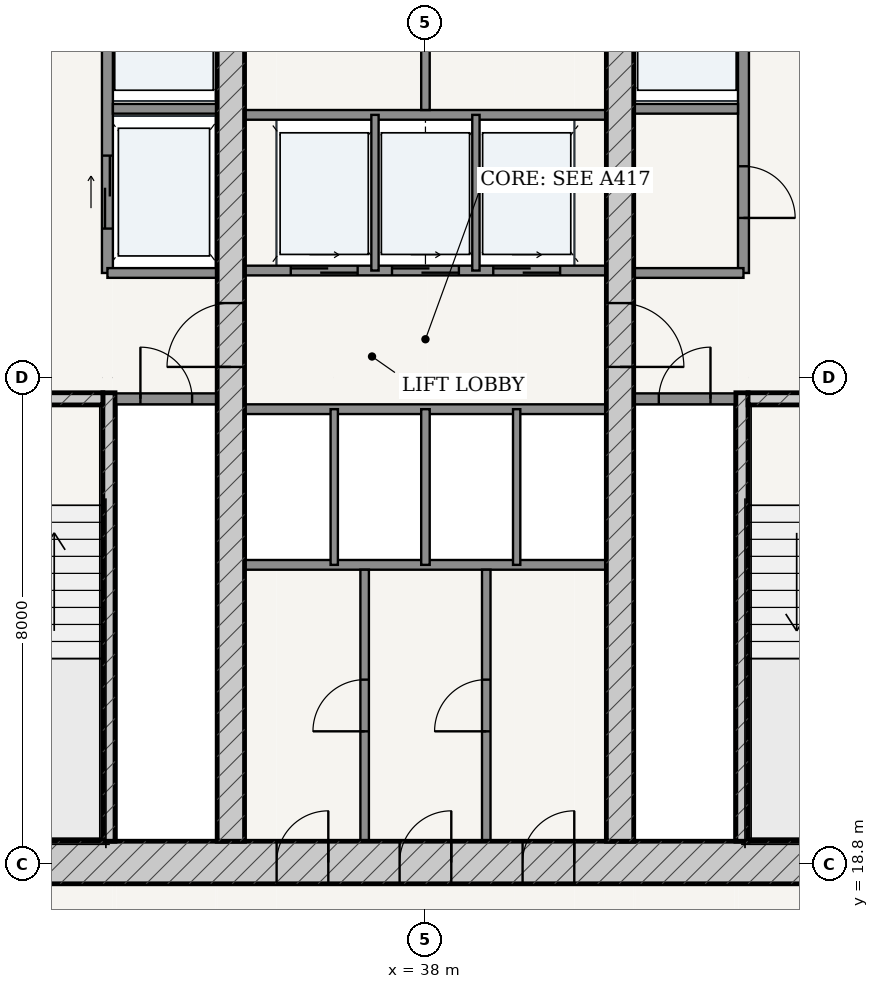
"""IFC4 building model, lengths in metres.
Left out: names, types, materials, properties, quantities, classifications, styles, units other than length and angle.
Written with IfcOpenShell. Run it as: python <this file> out.ifc"""

import sys

from ifc_helpers import new_model, si_unit, direction, frame, frame_2d, origin, place, context, subcontext, project, spatial, rectangle, extrude, source, transform, mapped, element, fill, save


model = new_model("IFC4")
c1 = context("Model", 3, precision=1e-05, world=origin(), true_north=direction((-0.2419218956, 0.970295726276)))
c2 = subcontext(c1, "Body", "Model", "MODEL_VIEW")
j1 = project(units=[si_unit("LENGTHUNIT", "METRE"), si_unit("PLANEANGLEUNIT", "RADIAN")], contexts=[c1])
p1 = place(None, origin())
s1 = spatial("IfcSite", under=j1, at=p1, CompositionType="ELEMENT")
p2 = place(p1, origin())
s2 = spatial("IfcBuilding", under=s1, at=p2, CompositionType="ELEMENT")
p3 = place(p2, frame((0.0, 0.0, 108.6)))
s3 = spatial("IfcBuildingStorey", under=s2, at=p3, CompositionType="ELEMENT", Elevation=108.6)
p4 = place(p3, frame((28.675, 18.825, 0.0), z_axis=(0.0, 0.0, 1.0), x_axis=(1.0, 0.0, 0.0)))
e1 = element("IfcWall", 1, at=p4, inside=s3, PredefinedType="SHEAR", context=c2, shape_type="SweptSolid", body=[
    extrude(rectangle(XDim=18.65, YDim=0.7, at=frame_2d((9.325, 0.0))), origin(), (0.0, 0.0, 1.0), 3.325),
])
p5 = place(p4, frame((6.877, 0.0, 0.0)))
e2 = element("IfcOpeningElement", 2, at=p5, cuts=e1, PredefinedType="OPENING", context=c2, shape_type="SweptSolid", body=[
    extrude(rectangle(XDim=0.85, YDim=2.1, at=frame_2d((0.425, 1.05))), frame((0.0, 0.36, 0.0), z_axis=(0.0, -1.0, 0.0), x_axis=(1.0, 0.0, 0.0)), (0.0, 0.0, 1.0), 0.72),
])
p6 = place(p4, frame((8.9, 0.0, 0.0)))
e3 = element("IfcOpeningElement", 3, at=p6, cuts=e1, PredefinedType="OPENING", context=c2, shape_type="SweptSolid", body=[
    extrude(rectangle(XDim=0.85, YDim=2.1, at=frame_2d((0.425, 1.05))), frame((0.0, 0.36, 0.0), z_axis=(0.0, -1.0, 0.0), x_axis=(1.0, 0.0, 0.0)), (0.0, 0.0, 1.0), 0.72),
])
p7 = place(p4, frame((10.923, 0.0, 0.0)))
e4 = element("IfcOpeningElement", 4, at=p7, cuts=e1, PredefinedType="OPENING", context=c2, shape_type="SweptSolid", body=[
    extrude(rectangle(XDim=0.85, YDim=2.1, at=frame_2d((0.425, 1.05))), frame((0.0, 0.36, 0.0), z_axis=(0.0, -1.0, 0.0), x_axis=(1.0, 0.0, 0.0)), (0.0, 0.0, 1.0), 0.72),
])
p8 = place(p3, frame((32.795, 19.175, 0.0), z_axis=(0.0, 0.0, 1.0), x_axis=(0.0, 1.0, 0.0)))
e5 = element("IfcWall", 5, at=p8, inside=s3, PredefinedType="SOLIDWALL", context=c2, shape_type="SweptSolid", body=[
    extrude(rectangle(XDim=7.375, YDim=0.2, at=frame_2d((3.688, 0.0))), origin(), (0.0, 0.0, 1.0), 3.325),
])
p9 = place(p3, frame((29.375, 26.45, 0.0), z_axis=(0.0, 0.0, 1.0), x_axis=(1.0, 0.0, 0.0)))
e6 = element("IfcWall", 6, at=p9, inside=s3, PredefinedType="SOLIDWALL", context=c2, shape_type="SweptSolid", body=[
    extrude(rectangle(XDim=3.32, YDim=0.2, at=frame_2d((1.66, 0.0))), origin(), (0.0, 0.0, 1.0), 3.325),
])
p10 = place(p9, frame((1.185, 0.0, 0.0)))
e7 = element("IfcOpeningElement", 7, at=p10, cuts=e6, PredefinedType="OPENING", context=c2, shape_type="SweptSolid", body=[
    extrude(rectangle(XDim=0.95, YDim=2.15, at=frame_2d((0.475, 1.075))), frame((0.0, 0.11, 0.0), z_axis=(0.0, -1.0, 0.0), x_axis=(1.0, 0.0, 0.0)), (0.0, 0.0, 1.0), 0.22),
])
p11 = place(p3, frame((43.205, 19.175, 0.0), z_axis=(0.0, 0.0, 1.0), x_axis=(0.0, 1.0, 0.0)))
e8 = element("IfcWall", 8, at=p11, inside=s3, PredefinedType="SOLIDWALL", context=c2, shape_type="SweptSolid", body=[
    extrude(rectangle(XDim=7.375, YDim=0.2, at=frame_2d((3.688, 0.0))), origin(), (0.0, 0.0, 1.0), 3.325),
])
p12 = place(p3, frame((43.305, 26.45, 0.0), z_axis=(0.0, 0.0, 1.0), x_axis=(1.0, 0.0, 0.0)))
e9 = element("IfcWall", 9, at=p12, inside=s3, PredefinedType="SOLIDWALL", context=c2, shape_type="SweptSolid", body=[
    extrude(rectangle(XDim=3.32, YDim=0.2, at=frame_2d((1.66, 0.0))), origin(), (0.0, 0.0, 1.0), 3.325),
])
p13 = place(p12, frame((1.185, 0.0, 0.0)))
e10 = element("IfcOpeningElement", 10, at=p13, cuts=e9, PredefinedType="OPENING", context=c2, shape_type="SweptSolid", body=[
    extrude(rectangle(XDim=0.95, YDim=2.15, at=frame_2d((0.475, 1.075))), frame((0.0, 0.11, 0.0), z_axis=(0.0, -1.0, 0.0), x_axis=(1.0, 0.0, 0.0)), (0.0, 0.0, 1.0), 0.22),
])
p14 = place(p3, frame((34.8, 19.175, 0.0), z_axis=(0.0, 0.0, 1.0), x_axis=(0.0, 1.0, 0.0)))
e11 = element("IfcWall", 11, at=p14, inside=s3, PredefinedType="SHEAR", context=c2, shape_type="SweptSolid", body=[
    extrude(rectangle(XDim=15.25, YDim=0.45, at=frame_2d((7.625, 0.0))), origin(), (0.0, 0.0, 1.0), 3.325),
])
p15 = place(p14, frame((7.8, 0.0, 0.0)))
e12 = element("IfcOpeningElement", 12, at=p15, cuts=e11, PredefinedType="OPENING", context=c2, shape_type="SweptSolid", body=[
    extrude(rectangle(XDim=1.05, YDim=2.15, at=frame_2d((0.525, 1.075))), frame((0.0, 0.235, 0.0), z_axis=(0.0, -1.0, 0.0), x_axis=(1.0, 0.0, 0.0)), (0.0, 0.0, 1.0), 0.47),
])
p16 = place(p3, frame((41.2, 19.175, 0.0), z_axis=(0.0, 0.0, 1.0), x_axis=(0.0, 1.0, 0.0)))
e13 = element("IfcWall", 13, at=p16, inside=s3, PredefinedType="SHEAR", context=c2, shape_type="SweptSolid", body=[
    extrude(rectangle(XDim=15.25, YDim=0.45, at=frame_2d((7.625, 0.0))), origin(), (0.0, 0.0, 1.0), 3.325),
])
p17 = place(p16, frame((7.8, 0.0, 0.0)))
e14 = element("IfcOpeningElement", 14, at=p17, cuts=e13, PredefinedType="OPENING", context=c2, shape_type="SweptSolid", body=[
    extrude(rectangle(XDim=1.05, YDim=2.15, at=frame_2d((0.525, 1.075))), frame((0.0, 0.235, 0.0), z_axis=(0.0, -1.0, 0.0), x_axis=(1.0, 0.0, 0.0)), (0.0, 0.0, 1.0), 0.47),
])
p18 = place(p3, frame((32.9, 26.45, 0.0), z_axis=(0.0, 0.0, 1.0), x_axis=(1.0, 0.0, 0.0)))
e15 = element("IfcWall", 15, at=p18, inside=s3, PredefinedType="PARTITIONING", context=c2, shape_type="SweptSolid", body=[
    extrude(rectangle(XDim=1.675, YDim=0.18, at=frame_2d((0.837, 0.0))), origin(), (0.0, 0.0, 1.0), 3.325),
])
p19 = place(p18, frame((0.413, 0.0, 0.0)))
e16 = element("IfcOpeningElement", 16, at=p19, cuts=e15, PredefinedType="OPENING", context=c2, shape_type="SweptSolid", body=[
    extrude(rectangle(XDim=0.85, YDim=2.1, at=frame_2d((0.425, 1.05))), frame((0.0, 0.1, 0.0), z_axis=(0.0, -1.0, 0.0), x_axis=(1.0, 0.0, 0.0)), (0.0, 0.0, 1.0), 0.2),
])
p20 = place(p3, frame((41.425, 26.45, 0.0), z_axis=(0.0, 0.0, 1.0), x_axis=(1.0, 0.0, 0.0)))
e17 = element("IfcWall", 17, at=p20, inside=s3, PredefinedType="PARTITIONING", context=c2, shape_type="SweptSolid", body=[
    extrude(rectangle(XDim=1.675, YDim=0.18, at=frame_2d((0.837, 0.0))), origin(), (0.0, 0.0, 1.0), 3.325),
])
p21 = place(p20, frame((0.413, 0.0, 0.0)))
e18 = element("IfcOpeningElement", 18, at=p21, cuts=e17, PredefinedType="OPENING", context=c2, shape_type="SweptSolid", body=[
    extrude(rectangle(XDim=0.85, YDim=2.1, at=frame_2d((0.425, 1.05))), frame((0.0, 0.1, 0.0), z_axis=(0.0, -1.0, 0.0), x_axis=(1.0, 0.0, 0.0)), (0.0, 0.0, 1.0), 0.2),
])
p22 = place(p3, frame((32.77, 28.52, 0.0), z_axis=(0.0, 0.0, 1.0), x_axis=(0.0, 1.0, 0.0)))
e19 = element("IfcWall", 19, at=p22, inside=s3, PredefinedType="PARTITIONING", context=c2, shape_type="SweptSolid", body=[
    extrude(rectangle(XDim=5.905, YDim=0.18, at=frame_2d((2.953, 0.0))), origin(), (0.0, 0.0, 1.0), 3.325),
])
p23 = place(p22, frame((3.655, 0.0, 0.0)))
e20 = element("IfcOpeningElement", 20, at=p23, cuts=e19, PredefinedType="OPENING", context=c2, shape_type="SweptSolid", body=[
    extrude(rectangle(XDim=1.15, YDim=2.2, at=frame_2d((0.575, 1.1))), frame((0.0, 0.1, 0.0), z_axis=(0.0, -1.0, 0.0), x_axis=(1.0, 0.0, 0.0)), (0.0, 0.0, 1.0), 0.2),
])
p24 = place(p22, frame((0.73, 0.0, 0.0)))
e21 = element("IfcOpeningElement", 21, at=p24, cuts=e19, PredefinedType="OPENING", context=c2, shape_type="SweptSolid", body=[
    extrude(rectangle(XDim=1.2, YDim=2.25, at=frame_2d((0.6, 1.125))), frame((0.0, 0.1, 0.0), z_axis=(0.0, -1.0, 0.0), x_axis=(1.0, 0.0, 0.0)), (0.0, 0.0, 1.0), 0.2),
])
p25 = place(p3, frame((32.86, 31.22, 0.0), z_axis=(0.0, 0.0, 1.0), x_axis=(1.0, 0.0, 0.0)))
e22 = element("IfcWall", 22, at=p25, inside=s3, PredefinedType="PARTITIONING", context=c2, shape_type="SweptSolid", body=[
    extrude(rectangle(XDim=1.715, YDim=0.16, at=frame_2d((0.857, 0.0))), origin(), (0.0, 0.0, 1.0), 3.325),
])
p26 = place(p3, frame((32.77, 28.52, 0.0), z_axis=(0.0, 0.0, 1.0), x_axis=(1.0, 0.0, 0.0)))
e23 = element("IfcWall", 23, at=p26, inside=s3, PredefinedType="PARTITIONING", context=c2, shape_type="SweptSolid", body=[
    extrude(rectangle(XDim=1.805, YDim=0.16, at=frame_2d((0.902, 0.0))), origin(), (0.0, 0.0, 1.0), 3.325),
])
p27 = place(p3, frame((43.23, 28.52, 0.0), z_axis=(0.0, 0.0, 1.0), x_axis=(0.0, 1.0, 0.0)))
e24 = element("IfcWall", 24, at=p27, inside=s3, PredefinedType="PARTITIONING", context=c2, shape_type="SweptSolid", body=[
    extrude(rectangle(XDim=5.905, YDim=0.18, at=frame_2d((2.953, 0.0))), origin(), (0.0, 0.0, 1.0), 3.325),
])
p28 = place(p27, frame((0.905, 0.0, 0.0)))
e25 = element("IfcOpeningElement", 25, at=p28, cuts=e24, PredefinedType="OPENING", context=c2, shape_type="SweptSolid", body=[
    extrude(rectangle(XDim=0.85, YDim=2.1, at=frame_2d((0.425, 1.05))), frame((0.0, 0.1, 0.0), z_axis=(0.0, -1.0, 0.0), x_axis=(1.0, 0.0, 0.0)), (0.0, 0.0, 1.0), 0.2),
])
p29 = place(p27, frame((3.655, 0.0, 0.0)))
e26 = element("IfcOpeningElement", 26, at=p29, cuts=e24, PredefinedType="OPENING", context=c2, shape_type="SweptSolid", body=[
    extrude(rectangle(XDim=1.15, YDim=2.2, at=frame_2d((0.575, 1.1))), frame((0.0, 0.1, 0.0), z_axis=(0.0, -1.0, 0.0), x_axis=(1.0, 0.0, 0.0)), (0.0, 0.0, 1.0), 0.2),
])
p30 = place(p3, frame((41.425, 31.22, 0.0), z_axis=(0.0, 0.0, 1.0), x_axis=(1.0, 0.0, 0.0)))
e27 = element("IfcWall", 27, at=p30, inside=s3, PredefinedType="PARTITIONING", context=c2, shape_type="SweptSolid", body=[
    extrude(rectangle(XDim=1.715, YDim=0.16, at=frame_2d((0.857, 0.0))), origin(), (0.0, 0.0, 1.0), 3.325),
])
p31 = place(p3, frame((41.425, 28.52, 0.0), z_axis=(0.0, 0.0, 1.0), x_axis=(1.0, 0.0, 0.0)))
e28 = element("IfcWall", 28, at=p31, inside=s3, PredefinedType="PARTITIONING", context=c2, shape_type="SweptSolid", body=[
    extrude(rectangle(XDim=1.805, YDim=0.16, at=frame_2d((0.902, 0.0))), origin(), (0.0, 0.0, 1.0), 3.325),
])
p32 = place(p3, frame((35.025, 28.56, 0.0), z_axis=(0.0, 0.0, 1.0), x_axis=(1.0, 0.0, 0.0)))
e29 = element("IfcWall", 29, at=p32, inside=s3, PredefinedType="PARTITIONING", context=c2, shape_type="SweptSolid", body=[
    extrude(rectangle(XDim=5.95, YDim=0.16, at=frame_2d((2.975, 0.0))), origin(), (0.0, 0.0, 1.0), 3.325),
])
p33 = place(p32, frame((0.76, 0.0, 0.0)))
e30 = element("IfcOpeningElement", 30, at=p33, cuts=e29, PredefinedType="OPENING", context=c2, shape_type="SweptSolid", body=[
    extrude(rectangle(XDim=1.1, YDim=2.2, at=frame_2d((0.55, 1.1))), frame((0.0, 0.09, 0.0), z_axis=(0.0, -1.0, 0.0), x_axis=(1.0, 0.0, 0.0)), (0.0, 0.0, 1.0), 0.18),
])
p34 = place(p32, frame((2.425, 0.0, 0.0)))
e31 = element("IfcOpeningElement", 31, at=p34, cuts=e29, PredefinedType="OPENING", context=c2, shape_type="SweptSolid", body=[
    extrude(rectangle(XDim=1.1, YDim=2.2, at=frame_2d((0.55, 1.1))), frame((0.0, 0.09, 0.0), z_axis=(0.0, -1.0, 0.0), x_axis=(1.0, 0.0, 0.0)), (0.0, 0.0, 1.0), 0.18),
])
p35 = place(p32, frame((4.09, 0.0, 0.0)))
e32 = element("IfcOpeningElement", 32, at=p35, cuts=e29, PredefinedType="OPENING", context=c2, shape_type="SweptSolid", body=[
    extrude(rectangle(XDim=1.1, YDim=2.2, at=frame_2d((0.55, 1.1))), frame((0.0, 0.09, 0.0), z_axis=(0.0, -1.0, 0.0), x_axis=(1.0, 0.0, 0.0)), (0.0, 0.0, 1.0), 0.18),
])
p36 = place(p3, frame((35.025, 31.12, 0.0), z_axis=(0.0, 0.0, 1.0), x_axis=(1.0, 0.0, 0.0)))
e33 = element("IfcWall", 33, at=p36, inside=s3, PredefinedType="PARTITIONING", context=c2, shape_type="SweptSolid", body=[
    extrude(rectangle(XDim=5.95, YDim=0.16, at=frame_2d((2.975, 0.0))), origin(), (0.0, 0.0, 1.0), 3.325),
])
for number, where, z_axis, x_axis in (
    (34, (37.17, 28.56, 0.0), (0.0, 0.0, 1.0), (0.0, 1.0, 0.0)),
    (35, (38.83, 28.56, 0.0), (0.0, 0.0, 1.0), (0.0, 1.0, 0.0)),
):
    element("IfcWall", number, at=place(p3, frame(where, z_axis=z_axis, x_axis=x_axis)), inside=s3, PredefinedType="PARTITIONING", context=c2, shape_type="SweptSolid", body=[
        extrude(rectangle(XDim=2.56, YDim=0.12, at=frame_2d((1.28, 0.0))), origin(), (0.0, 0.0, 1.0), 3.325),
    ])
p37 = place(p3, frame((38.0, 31.2, 0.0), z_axis=(0.0, 0.0, 1.0), x_axis=(0.0, 1.0, 0.0)))
e36 = element("IfcWall", 36, at=p37, inside=s3, PredefinedType="PARTITIONING", context=c2, shape_type="SweptSolid", body=[
    extrude(rectangle(XDim=3.225, YDim=0.14, at=frame_2d((1.613, 0.0))), origin(), (0.0, 0.0, 1.0), 3.325),
])
for number, where, z_axis, x_axis in (
    (37, (35.025, 26.28, 0.0), (0.0, 0.0, 1.0), (1.0, 0.0, 0.0)),
    (38, (35.025, 23.72, 0.0), (0.0, 0.0, 1.0), (1.0, 0.0, 0.0)),
):
    element("IfcWall", number, at=place(p3, frame(where, z_axis=z_axis, x_axis=x_axis)), inside=s3, PredefinedType="PARTITIONING", context=c2, shape_type="SweptSolid", body=[
        extrude(rectangle(XDim=5.95, YDim=0.16, at=frame_2d((2.975, 0.0))), origin(), (0.0, 0.0, 1.0), 3.325),
    ])
p38 = place(p3, frame((36.5, 23.72, 0.0), z_axis=(0.0, 0.0, 1.0), x_axis=(0.0, 1.0, 0.0)))
e39 = element("IfcWall", 39, at=p38, inside=s3, PredefinedType="PARTITIONING", context=c2, shape_type="SweptSolid", body=[
    extrude(rectangle(XDim=2.56, YDim=0.12, at=frame_2d((1.28, 0.0))), origin(), (0.0, 0.0, 1.0), 3.325),
])
p39 = place(p3, frame((38.0, 23.72, 0.0), z_axis=(0.0, 0.0, 1.0), x_axis=(0.0, 1.0, 0.0)))
e40 = element("IfcWall", 40, at=p39, inside=s3, PredefinedType="PARTITIONING", context=c2, shape_type="SweptSolid", body=[
    extrude(rectangle(XDim=2.56, YDim=0.14, at=frame_2d((1.28, 0.0))), origin(), (0.0, 0.0, 1.0), 3.325),
])
p40 = place(p3, frame((39.5, 23.72, 0.0), z_axis=(0.0, 0.0, 1.0), x_axis=(0.0, 1.0, 0.0)))
e41 = element("IfcWall", 41, at=p40, inside=s3, PredefinedType="PARTITIONING", context=c2, shape_type="SweptSolid", body=[
    extrude(rectangle(XDim=2.56, YDim=0.12, at=frame_2d((1.28, 0.0))), origin(), (0.0, 0.0, 1.0), 3.325),
])
p41 = place(p3, frame((37.0, 19.175, 0.0), z_axis=(0.0, 0.0, 1.0), x_axis=(0.0, 1.0, 0.0)))
e42 = element("IfcWall", 42, at=p41, inside=s3, PredefinedType="PARTITIONING", context=c2, shape_type="SweptSolid", body=[
    extrude(rectangle(XDim=4.465, YDim=0.14, at=frame_2d((2.232, 0.0))), origin(), (0.0, 0.0, 1.0), 3.325),
])
p42 = place(p41, frame((1.808, 0.0, 0.0)))
e43 = element("IfcOpeningElement", 43, at=p42, cuts=e42, PredefinedType="OPENING", context=c2, shape_type="SweptSolid", body=[
    extrude(rectangle(XDim=0.85, YDim=2.1, at=frame_2d((0.425, 1.05))), frame((0.0, 0.08, 0.0), z_axis=(0.0, -1.0, 0.0), x_axis=(1.0, 0.0, 0.0)), (0.0, 0.0, 1.0), 0.16),
])
p43 = place(p3, frame((39.0, 19.175, 0.0), z_axis=(0.0, 0.0, 1.0), x_axis=(0.0, 1.0, 0.0)))
e44 = element("IfcWall", 44, at=p43, inside=s3, PredefinedType="PARTITIONING", context=c2, shape_type="SweptSolid", body=[
    extrude(rectangle(XDim=4.465, YDim=0.14, at=frame_2d((2.232, 0.0))), origin(), (0.0, 0.0, 1.0), 3.325),
])
p44 = place(p43, frame((1.808, 0.0, 0.0)))
e45 = element("IfcOpeningElement", 45, at=p44, cuts=e44, PredefinedType="OPENING", context=c2, shape_type="SweptSolid", body=[
    extrude(rectangle(XDim=0.85, YDim=2.1, at=frame_2d((0.425, 1.05))), frame((0.0, 0.08, 0.0), z_axis=(0.0, -1.0, 0.0), x_axis=(1.0, 0.0, 0.0)), (0.0, 0.0, 1.0), 0.16),
])
m1 = source(origin(), c2, "Body", "SweptSolid", [
    extrude(rectangle(XDim=1.05, YDim=2.15, at=frame_2d((0.525, 1.075))), frame((0.0, 0.025, 0.0), z_axis=(0.0, -1.0, 0.0), x_axis=(1.0, 0.0, 0.0)), (0.0, 0.0, 1.0), 0.05),
])
p45 = place(p15, origin())
e46 = element("IfcDoor", 46, at=p45, inside=s3, OperationType="SINGLE_SWING_LEFT", PredefinedType="DOOR", context=c2, shape_type="MappedRepresentation", body=[
    mapped(m1, transform((0.0, 0.0, 0.0), scale=1.0)),
])
fill(e12, e46)
p46 = place(p17, frame((1.05, 0.0, 0.0), z_axis=(0.0, 0.0, 1.0), x_axis=(-1.0, 0.0, 0.0)))
e47 = element("IfcDoor", 47, at=p46, inside=s3, OperationType="SINGLE_SWING_RIGHT", PredefinedType="DOOR", context=c2, shape_type="MappedRepresentation", body=[
    mapped(m1, transform((0.0, 0.0, 0.0), scale=1.0)),
])
fill(e14, e47)
m2 = source(origin(), c2, "Body", "SweptSolid", [
    extrude(rectangle(XDim=0.85, YDim=2.1, at=frame_2d((0.425, 1.05))), frame((0.0, 0.025, 0.0), z_axis=(0.0, -1.0, 0.0), x_axis=(1.0, 0.0, 0.0)), (0.0, 0.0, 1.0), 0.05),
])
p47 = place(p19, origin())
e48 = element("IfcDoor", 48, at=p47, inside=s3, OperationType="SINGLE_SWING_LEFT", PredefinedType="DOOR", context=c2, shape_type="MappedRepresentation", body=[
    mapped(m2, transform((0.0, 0.0, 0.0), scale=1.0)),
])
fill(e16, e48)
p48 = place(p21, origin())
e49 = element("IfcDoor", 49, at=p48, inside=s3, OperationType="SINGLE_SWING_RIGHT", PredefinedType="DOOR", context=c2, shape_type="MappedRepresentation", body=[
    mapped(m2, transform((0.0, 0.0, 0.0), scale=1.0)),
])
fill(e18, e49)
p49 = place(p28, frame((0.85, 0.0, 0.0), z_axis=(0.0, 0.0, 1.0), x_axis=(-1.0, 0.0, 0.0)))
e50 = element("IfcDoor", 50, at=p49, inside=s3, OperationType="SINGLE_SWING_RIGHT", PredefinedType="DOOR", context=c2, shape_type="MappedRepresentation", body=[
    mapped(m2, transform((0.0, 0.0, 0.0), scale=1.0)),
])
fill(e25, e50)
p50 = place(p5, origin())
e51 = element("IfcDoor", 51, at=p50, inside=s3, OperationType="SINGLE_SWING_RIGHT", PredefinedType="DOOR", context=c2, shape_type="MappedRepresentation", body=[
    mapped(m2, transform((0.0, 0.0, 0.0), scale=1.0)),
])
fill(e2, e51)
p51 = place(p6, origin())
e52 = element("IfcDoor", 52, at=p51, inside=s3, OperationType="SINGLE_SWING_RIGHT", PredefinedType="DOOR", context=c2, shape_type="MappedRepresentation", body=[
    mapped(m2, transform((0.0, 0.0, 0.0), scale=1.0)),
])
fill(e3, e52)
p52 = place(p7, origin())
e53 = element("IfcDoor", 53, at=p52, inside=s3, OperationType="SINGLE_SWING_RIGHT", PredefinedType="DOOR", context=c2, shape_type="MappedRepresentation", body=[
    mapped(m2, transform((0.0, 0.0, 0.0), scale=1.0)),
])
fill(e4, e53)
p53 = place(p42, origin())
e54 = element("IfcDoor", 54, at=p53, inside=s3, OperationType="SINGLE_SWING_LEFT", PredefinedType="DOOR", context=c2, shape_type="MappedRepresentation", body=[
    mapped(m2, transform((0.0, 0.0, 0.0), scale=1.0)),
])
fill(e43, e54)
p54 = place(p44, origin())
e55 = element("IfcDoor", 55, at=p54, inside=s3, OperationType="SINGLE_SWING_LEFT", PredefinedType="DOOR", context=c2, shape_type="MappedRepresentation", body=[
    mapped(m2, transform((0.0, 0.0, 0.0), scale=1.0)),
])
fill(e45, e55)
m3 = source(origin(), c2, "Body", "SweptSolid", [
    extrude(rectangle(XDim=1.2, YDim=2.25, at=frame_2d((0.6, 1.125))), frame((0.0, 0.025, 0.0), z_axis=(0.0, -1.0, 0.0), x_axis=(1.0, 0.0, 0.0)), (0.0, 0.0, 1.0), 0.05),
])
p55 = place(p24, origin())
e56 = element("IfcDoor", 56, at=p55, inside=s3, OperationType="DOUBLE_DOOR_SLIDING", PredefinedType="DOOR", context=c2, shape_type="MappedRepresentation", body=[
    mapped(m3, transform((0.0, 0.0, 0.0), scale=1.0)),
])
fill(e21, e56)
m4 = source(origin(), c2, "Body", "SweptSolid", [
    extrude(rectangle(XDim=1.1, YDim=2.2, at=frame_2d((0.55, 1.1))), frame((0.0, 0.025, 0.0), z_axis=(0.0, -1.0, 0.0), x_axis=(1.0, 0.0, 0.0)), (0.0, 0.0, 1.0), 0.05),
])
p56 = place(p33, origin())
e57 = element("IfcDoor", 57, at=p56, inside=s3, OperationType="DOUBLE_DOOR_SLIDING", PredefinedType="DOOR", context=c2, shape_type="MappedRepresentation", body=[
    mapped(m4, transform((0.0, 0.0, 0.0), scale=1.0)),
])
fill(e30, e57)
p57 = place(p34, origin())
e58 = element("IfcDoor", 58, at=p57, inside=s3, OperationType="DOUBLE_DOOR_SLIDING", PredefinedType="DOOR", context=c2, shape_type="MappedRepresentation", body=[
    mapped(m4, transform((0.0, 0.0, 0.0), scale=1.0)),
])
fill(e31, e58)
p58 = place(p35, origin())
e59 = element("IfcDoor", 59, at=p58, inside=s3, OperationType="DOUBLE_DOOR_SLIDING", PredefinedType="DOOR", context=c2, shape_type="MappedRepresentation", body=[
    mapped(m4, transform((0.0, 0.0, 0.0), scale=1.0)),
])
fill(e32, e59)
save(model, sys.argv[1])
